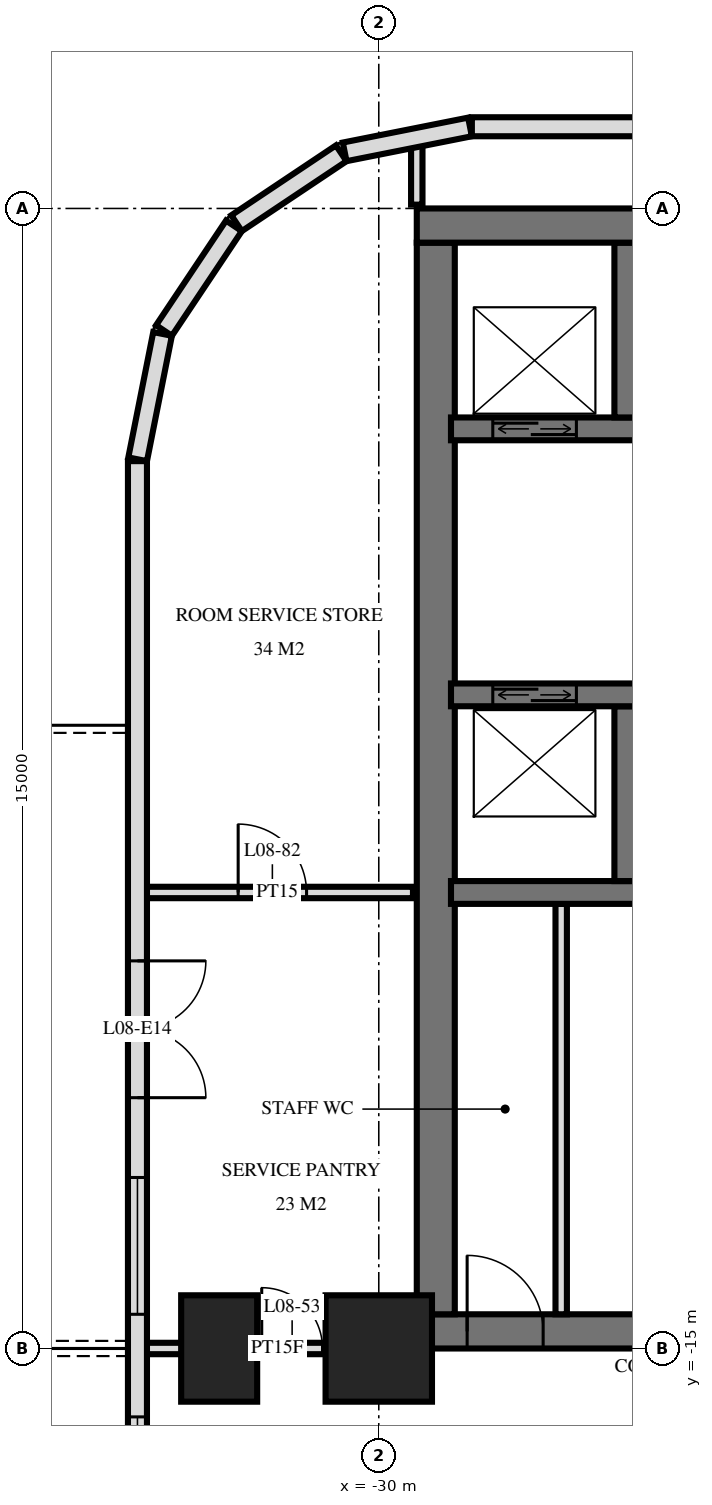
"""IFC4 building model, lengths in metres.
Left out: names, types, materials, properties, quantities, classifications, styles, units other than length and angle.
Written with IfcOpenShell. Run it as: python <this file> out.ifc"""

import sys

from ifc_helpers import new_model, si_unit, direction, frame, frame_2d, origin, origin_2d, place, context, subcontext, project, spatial, rectangle, extrude, element, fill, save


model = new_model("IFC4")
c1 = context("Model", 3, precision=1e-05, world=origin(), true_north=direction((0.0, 1.0)))
c2 = subcontext(c1, "Body", "Model", "MODEL_VIEW")
j1 = project(units=[si_unit("LENGTHUNIT", "METRE"), si_unit("PLANEANGLEUNIT", "RADIAN")], contexts=[c1])
p1 = place(None, origin())
s1 = spatial("IfcSite", under=j1, at=p1, CompositionType="ELEMENT")
p2 = place(p1, origin())
s2 = spatial("IfcBuilding", under=s1, at=p2, CompositionType="ELEMENT")
p3 = place(p2, frame((0.0, 0.0, 38.4)))
s3 = spatial("IfcBuildingStorey", under=s2, at=p3, CompositionType="ELEMENT", Elevation=38.4)
p4 = place(p3, frame((-32.1, -15.0, 0.0), z_axis=(0.0, 0.0, 1.0), x_axis=(0.0, 1.0, 0.0)))
e1 = element("IfcColumn", 1, at=p4, inside=s3, PredefinedType="COLUMN", context=c2, shape_type="SweptSolid", body=[
    extrude(rectangle(XDim=1.4, YDim=1.0, at=origin_2d()), origin(), (0.0, 0.0, 1.0), 3.6),
])
p5 = place(p3, frame((-30.0, -15.0, 0.0), z_axis=(0.0, 0.0, 1.0), x_axis=(1.0, 0.0, 0.0)))
e2 = element("IfcColumn", 2, at=p5, inside=s3, PredefinedType="COLUMN", context=c2, shape_type="SweptSolid", body=[
    extrude(rectangle(XDim=1.4, YDim=1.4, at=origin_2d()), origin(), (0.0, 0.0, 1.0), 3.6),
])
p6 = place(p3, frame((-29.5, -0.225, 0.0), z_axis=(0.0, 0.0, 1.0), x_axis=(1.0, 0.0, 0.0)))
e3 = element("IfcWall", 3, at=p6, inside=s3, PredefinedType="SHEAR", context=c2, shape_type="SweptSolid", body=[
    extrude(rectangle(XDim=19.5, YDim=0.45, at=frame_2d((9.75, 0.0))), origin(), (0.0, 0.0, 1.0), 3.6),
])
p7 = place(p3, frame((-29.5, -14.775, 0.0), z_axis=(0.0, 0.0, 1.0), x_axis=(1.0, 0.0, 0.0)))
e4 = element("IfcWall", 4, at=p7, inside=s3, PredefinedType="SHEAR", context=c2, shape_type="SweptSolid", body=[
    extrude(rectangle(XDim=19.5, YDim=0.45, at=frame_2d((9.75, 0.0))), origin(), (0.0, 0.0, 1.0), 3.6),
])
p8 = place(p7, frame((11.2, 0.0, 0.0)))
e5 = element("IfcOpeningElement", 5, at=p8, cuts=e4, PredefinedType="OPENING", context=c2, shape_type="SweptSolid", body=[
    extrude(rectangle(XDim=1.2, YDim=2.1, at=frame_2d((0.6, 1.05))), frame((0.0, 0.235, 0.0), z_axis=(0.0, -1.0, 0.0), x_axis=(1.0, 0.0, 0.0)), (0.0, 0.0, 1.0), 0.47),
])
p9 = place(p7, frame((14.25, 0.0, 0.0)))
e6 = element("IfcOpeningElement", 6, at=p9, cuts=e4, PredefinedType="OPENING", context=c2, shape_type="SweptSolid", body=[
    extrude(rectangle(XDim=1.1, YDim=2.1, at=frame_2d((0.55, 1.05))), frame((0.0, 0.235, 0.0), z_axis=(0.0, -1.0, 0.0), x_axis=(1.0, 0.0, 0.0)), (0.0, 0.0, 1.0), 0.47),
])
p10 = place(p7, frame((8.5, 0.0, 0.0)))
e7 = element("IfcOpeningElement", 7, at=p10, cuts=e4, PredefinedType="OPENING", context=c2, shape_type="SweptSolid", body=[
    extrude(rectangle(XDim=0.9, YDim=2.1, at=frame_2d((0.45, 1.05))), frame((0.0, 0.235, 0.0), z_axis=(0.0, -1.0, 0.0), x_axis=(1.0, 0.0, 0.0)), (0.0, 0.0, 1.0), 0.47),
])
p11 = place(p7, frame((6.05, 0.0, 0.0)))
e8 = element("IfcOpeningElement", 8, at=p11, cuts=e4, PredefinedType="OPENING", context=c2, shape_type="SweptSolid", body=[
    extrude(rectangle(XDim=1.0, YDim=2.1, at=frame_2d((0.5, 1.05))), frame((0.0, 0.235, 0.0), z_axis=(0.0, -1.0, 0.0), x_axis=(1.0, 0.0, 0.0)), (0.0, 0.0, 1.0), 0.47),
])
p12 = place(p7, frame((2.988, 0.0, 0.0)))
e9 = element("IfcOpeningElement", 9, at=p12, cuts=e4, PredefinedType="OPENING", context=c2, shape_type="SweptSolid", body=[
    extrude(rectangle(XDim=1.0, YDim=2.1, at=frame_2d((0.5, 1.05))), frame((0.0, 0.235, 0.0), z_axis=(0.0, -1.0, 0.0), x_axis=(1.0, 0.0, 0.0)), (0.0, 0.0, 1.0), 0.47),
])
p13 = place(p7, frame((0.663, 0.0, 0.0)))
e10 = element("IfcOpeningElement", 10, at=p13, cuts=e4, PredefinedType="OPENING", context=c2, shape_type="SweptSolid", body=[
    extrude(rectangle(XDim=1.0, YDim=2.1, at=frame_2d((0.5, 1.05))), frame((0.0, 0.235, 0.0), z_axis=(0.0, -1.0, 0.0), x_axis=(1.0, 0.0, 0.0)), (0.0, 0.0, 1.0), 0.47),
])
p14 = place(p3, frame((-29.25, -14.55, 0.0), z_axis=(0.0, 0.0, 1.0), x_axis=(0.0, 1.0, 0.0)))
e11 = element("IfcWall", 11, at=p14, inside=s3, PredefinedType="SHEAR", context=c2, shape_type="SweptSolid", body=[
    extrude(rectangle(XDim=14.1, YDim=0.5, at=frame_2d((7.05, 0.0))), origin(), (0.0, 0.0, 1.0), 3.6),
])
p15 = place(p3, frame((-29.05, -2.9, 0.0), z_axis=(0.0, 0.0, 1.0), x_axis=(1.0, 0.0, 0.0)))
e12 = element("IfcWall", 12, at=p15, inside=s3, PredefinedType="SHEAR", context=c2, shape_type="SweptSolid", body=[
    extrude(rectangle(XDim=18.7, YDim=0.3, at=frame_2d((9.35, 0.0))), origin(), (0.0, 0.0, 1.0), 3.6),
])
p16 = place(p15, frame((2.95, 0.0, 0.0)))
e13 = element("IfcOpeningElement", 13, at=p16, cuts=e12, PredefinedType="OPENING", context=c2, shape_type="SweptSolid", body=[
    extrude(rectangle(XDim=1.1, YDim=2.1, at=frame_2d((0.55, 1.05))), frame((0.0, 0.16, 0.0), z_axis=(0.0, -1.0, 0.0), x_axis=(1.0, 0.0, 0.0)), (0.0, 0.0, 1.0), 0.32),
])
p17 = place(p15, frame((0.55, 0.0, 0.0)))
e14 = element("IfcOpeningElement", 14, at=p17, cuts=e12, PredefinedType="OPENING", context=c2, shape_type="SweptSolid", body=[
    extrude(rectangle(XDim=1.1, YDim=2.1, at=frame_2d((0.55, 1.05))), frame((0.0, 0.16, 0.0), z_axis=(0.0, -1.0, 0.0), x_axis=(1.0, 0.0, 0.0)), (0.0, 0.0, 1.0), 0.32),
])
p18 = place(p15, frame((11.863, 0.0, 0.0)))
e15 = element("IfcOpeningElement", 15, at=p18, cuts=e12, PredefinedType="OPENING", context=c2, shape_type="SweptSolid", body=[
    extrude(rectangle(XDim=0.9, YDim=2.1, at=frame_2d((0.45, 1.05))), frame((0.0, 0.16, 0.0), z_axis=(0.0, -1.0, 0.0), x_axis=(1.0, 0.0, 0.0)), (0.0, 0.0, 1.0), 0.32),
])
p19 = place(p15, frame((10.438, 0.0, 0.0)))
e16 = element("IfcOpeningElement", 16, at=p19, cuts=e12, PredefinedType="OPENING", context=c2, shape_type="SweptSolid", body=[
    extrude(rectangle(XDim=0.9, YDim=2.1, at=frame_2d((0.45, 1.05))), frame((0.0, 0.16, 0.0), z_axis=(0.0, -1.0, 0.0), x_axis=(1.0, 0.0, 0.0)), (0.0, 0.0, 1.0), 0.32),
])
p20 = place(p15, frame((16.85, 0.0, 0.0)))
e17 = element("IfcOpeningElement", 17, at=p20, cuts=e12, PredefinedType="OPENING", context=c2, shape_type="SweptSolid", body=[
    extrude(rectangle(XDim=1.0, YDim=2.1, at=frame_2d((0.5, 1.05))), frame((0.0, 0.16, 0.0), z_axis=(0.0, -1.0, 0.0), x_axis=(1.0, 0.0, 0.0)), (0.0, 0.0, 1.0), 0.32),
])
p21 = place(p15, frame((14.562, 0.0, 0.0)))
e18 = element("IfcOpeningElement", 18, at=p21, cuts=e12, PredefinedType="OPENING", context=c2, shape_type="SweptSolid", body=[
    extrude(rectangle(XDim=1.0, YDim=2.1, at=frame_2d((0.5, 1.05))), frame((0.0, 0.16, 0.0), z_axis=(0.0, -1.0, 0.0), x_axis=(1.0, 0.0, 0.0)), (0.0, 0.0, 1.0), 0.32),
])
p22 = place(p15, frame((13.137, 0.0, 0.0)))
e19 = element("IfcOpeningElement", 19, at=p22, cuts=e12, PredefinedType="OPENING", context=c2, shape_type="SweptSolid", body=[
    extrude(rectangle(XDim=1.0, YDim=2.1, at=frame_2d((0.5, 1.05))), frame((0.0, 0.16, 0.0), z_axis=(0.0, -1.0, 0.0), x_axis=(1.0, 0.0, 0.0)), (0.0, 0.0, 1.0), 0.32),
])
p23 = place(p15, frame((5.6, 0.0, 0.0)))
e20 = element("IfcOpeningElement", 20, at=p23, cuts=e12, PredefinedType="OPENING", context=c2, shape_type="SweptSolid", body=[
    extrude(rectangle(XDim=1.0, YDim=2.1, at=frame_2d((0.5, 1.05))), frame((0.0, 0.16, 0.0), z_axis=(0.0, -1.0, 0.0), x_axis=(1.0, 0.0, 0.0)), (0.0, 0.0, 1.0), 0.32),
])
p24 = place(p3, frame((-29.05, -6.4, 0.0), z_axis=(0.0, 0.0, 1.0), x_axis=(1.0, 0.0, 0.0)))
e21 = element("IfcWall", 21, at=p24, inside=s3, PredefinedType="SHEAR", context=c2, shape_type="SweptSolid", body=[
    extrude(rectangle(XDim=18.7, YDim=0.3, at=frame_2d((9.35, 0.0))), origin(), (0.0, 0.0, 1.0), 3.6),
])
p25 = place(p24, frame((2.95, 0.0, 0.0)))
e22 = element("IfcOpeningElement", 22, at=p25, cuts=e21, PredefinedType="OPENING", context=c2, shape_type="SweptSolid", body=[
    extrude(rectangle(XDim=1.1, YDim=2.1, at=frame_2d((0.55, 1.05))), frame((0.0, 0.16, 0.0), z_axis=(0.0, -1.0, 0.0), x_axis=(1.0, 0.0, 0.0)), (0.0, 0.0, 1.0), 0.32),
])
p26 = place(p24, frame((0.55, 0.0, 0.0)))
e23 = element("IfcOpeningElement", 23, at=p26, cuts=e21, PredefinedType="OPENING", context=c2, shape_type="SweptSolid", body=[
    extrude(rectangle(XDim=1.1, YDim=2.1, at=frame_2d((0.55, 1.05))), frame((0.0, 0.16, 0.0), z_axis=(0.0, -1.0, 0.0), x_axis=(1.0, 0.0, 0.0)), (0.0, 0.0, 1.0), 0.32),
])
p27 = place(p24, frame((10.8, 0.0, 0.0)))
e24 = element("IfcOpeningElement", 24, at=p27, cuts=e21, PredefinedType="OPENING", context=c2, shape_type="SweptSolid", body=[
    extrude(rectangle(XDim=1.1, YDim=2.1, at=frame_2d((0.55, 1.05))), frame((0.0, 0.16, 0.0), z_axis=(0.0, -1.0, 0.0), x_axis=(1.0, 0.0, 0.0)), (0.0, 0.0, 1.0), 0.32),
])
p28 = place(p24, frame((5.6, 0.0, 0.0)))
e25 = element("IfcOpeningElement", 25, at=p28, cuts=e21, PredefinedType="OPENING", context=c2, shape_type="SweptSolid", body=[
    extrude(rectangle(XDim=1.0, YDim=2.1, at=frame_2d((0.5, 1.05))), frame((0.0, 0.16, 0.0), z_axis=(0.0, -1.0, 0.0), x_axis=(1.0, 0.0, 0.0)), (0.0, 0.0, 1.0), 0.32),
])
p29 = place(p3, frame((-29.05, -9.0, 0.0), z_axis=(0.0, 0.0, 1.0), x_axis=(1.0, 0.0, 0.0)))
e26 = element("IfcWall", 26, at=p29, inside=s3, PredefinedType="SHEAR", context=c2, shape_type="SweptSolid", body=[
    extrude(rectangle(XDim=18.7, YDim=0.3, at=frame_2d((9.35, 0.0))), origin(), (0.0, 0.0, 1.0), 3.6),
])
p30 = place(p29, frame((13.8, 0.0, 0.0)))
e27 = element("IfcOpeningElement", 27, at=p30, cuts=e26, PredefinedType="OPENING", context=c2, shape_type="SweptSolid", body=[
    extrude(rectangle(XDim=1.1, YDim=2.1, at=frame_2d((0.55, 1.05))), frame((0.0, 0.16, 0.0), z_axis=(0.0, -1.0, 0.0), x_axis=(1.0, 0.0, 0.0)), (0.0, 0.0, 1.0), 0.32),
])
for number, where, z_axis, x_axis in (
    (28, (-26.75, -2.75, 0.0), (0.0, 0.0, 1.0), (0.0, 1.0, 0.0)),
    (29, (-26.75, -8.85, 0.0), (0.0, 0.0, 1.0), (0.0, 1.0, 0.0)),
):
    element("IfcWall", number, at=place(p3, frame(where, z_axis=z_axis, x_axis=x_axis)), inside=s3, PredefinedType="SHEAR", context=c2, shape_type="SweptSolid", body=[
        extrude(rectangle(XDim=2.3, YDim=0.3, at=frame_2d((1.15, 0.0))), origin(), (0.0, 0.0, 1.0), 3.6),
    ])
p31 = place(p3, frame((28.775, 1.075, 0.0), z_axis=(0.0, 0.0, 1.0), x_axis=(-1.0, 0.0, 0.0)))
e30 = element("IfcWall", 30, at=p31, inside=s3, PredefinedType="SOLIDWALL", context=c2, shape_type="SweptSolid", body=[
    extrude(rectangle(XDim=57.551, YDim=0.25, at=frame_2d((28.775, 0.0))), origin(), (0.0, 0.0, 1.0), 3.32),
])
p32 = place(p31, frame((24.275, 0.0, 0.3)))
e31 = element("IfcOpeningElement", 31, at=p32, cuts=e30, PredefinedType="OPENING", context=c2, shape_type="SweptSolid", body=[
    extrude(rectangle(XDim=2.4, YDim=2.1, at=frame_2d((1.2, 1.05))), frame((0.0, 0.135, 0.0), z_axis=(0.0, -1.0, 0.0), x_axis=(1.0, 0.0, 0.0)), (0.0, 0.0, 1.0), 0.27),
])
p33 = place(p31, frame((35.325, 0.0, 0.3)))
e32 = element("IfcOpeningElement", 32, at=p33, cuts=e30, PredefinedType="OPENING", context=c2, shape_type="SweptSolid", body=[
    extrude(rectangle(XDim=2.4, YDim=2.1, at=frame_2d((1.2, 1.05))), frame((0.0, 0.135, 0.0), z_axis=(0.0, -1.0, 0.0), x_axis=(1.0, 0.0, 0.0)), (0.0, 0.0, 1.0), 0.27),
])
p34 = place(p3, frame((-28.8, 1.073, 0.0), z_axis=(0.0, 0.0, 1.0), x_axis=(-0.980803419081, -0.194999110559, 0.0)))
e33 = element("IfcWall", 33, at=p34, inside=s3, PredefinedType="SOLIDWALL", context=c2, shape_type="SweptSolid", body=[
    extrude(rectangle(XDim=1.681, YDim=0.25, at=frame_2d((0.841, 0.0))), origin(), (0.0, 0.0, 1.0), 3.32),
])
for number, where, z_axis, x_axis in (
    (34, (-30.494, 0.726, 0.0), (0.0, 0.0, 1.0), (-0.831, -0.556, 0.0)),
    (35, (-31.906, -0.229, 0.0), (0.0, 0.0, 1.0), (-0.556, -0.831, 0.0)),
):
    element("IfcWall", number, at=place(p3, frame(where, z_axis=z_axis, x_axis=x_axis)), inside=s3, PredefinedType="SOLIDWALL", context=c2, shape_type="SweptSolid", body=[
        extrude(rectangle(XDim=1.656, YDim=0.25, at=frame_2d((0.828, 0.0))), origin(), (0.0, 0.0, 1.0), 3.32),
    ])
p35 = place(p3, frame((-32.844, -1.651, 0.0), z_axis=(0.0, 0.0, 1.0), x_axis=(-0.19513878023, -0.980775640221, 0.0)))
e36 = element("IfcWall", 36, at=p35, inside=s3, PredefinedType="SOLIDWALL", context=c2, shape_type="SweptSolid", body=[
    extrude(rectangle(XDim=1.681, YDim=0.25, at=frame_2d((0.841, 0.0))), origin(), (0.0, 0.0, 1.0), 3.32),
])
p36 = place(p3, frame((-33.175, -3.325, 0.0), z_axis=(0.0, 0.0, 1.0), x_axis=(0.0, -1.0, 0.0)))
e37 = element("IfcWall", 37, at=p36, inside=s3, PredefinedType="SOLIDWALL", context=c2, shape_type="SweptSolid", body=[
    extrude(rectangle(XDim=21.551, YDim=0.25, at=frame_2d((10.775, 0.0))), origin(), (0.0, 0.0, 1.0), 3.32),
])
p37 = place(p36, frame((6.575, 0.0, 0.0)))
e38 = element("IfcOpeningElement", 38, at=p37, cuts=e37, PredefinedType="OPENING", context=c2, shape_type="SweptSolid", body=[
    extrude(rectangle(XDim=1.8, YDim=2.4, at=frame_2d((0.9, 1.2))), frame((0.0, 0.135, 0.0), z_axis=(0.0, -1.0, 0.0), x_axis=(1.0, 0.0, 0.0)), (0.0, 0.0, 1.0), 0.27),
])
p38 = place(p36, frame((9.425, 0.0, 0.3)))
e39 = element("IfcOpeningElement", 39, at=p38, cuts=e37, PredefinedType="OPENING", context=c2, shape_type="SweptSolid", body=[
    extrude(rectangle(XDim=1.8, YDim=2.1, at=frame_2d((0.9, 1.05))), frame((0.0, 0.135, 0.0), z_axis=(0.0, -1.0, 0.0), x_axis=(1.0, 0.0, 0.0)), (0.0, 0.0, 1.0), 0.27),
])
p39 = place(p36, frame((12.575, 0.0, 0.3)))
e40 = element("IfcOpeningElement", 40, at=p39, cuts=e37, PredefinedType="OPENING", context=c2, shape_type="SweptSolid", body=[
    extrude(rectangle(XDim=1.2, YDim=2.1, at=frame_2d((0.6, 1.05))), frame((0.0, 0.135, 0.0), z_axis=(0.0, -1.0, 0.0), x_axis=(1.0, 0.0, 0.0)), (0.0, 0.0, 1.0), 0.27),
])
p40 = place(p36, frame((15.6, 0.0, 0.0)))
e41 = element("IfcOpeningElement", 41, at=p40, cuts=e37, PredefinedType="OPENING", context=c2, shape_type="SweptSolid", body=[
    extrude(rectangle(XDim=1.8, YDim=2.4, at=frame_2d((0.9, 1.2))), frame((0.0, 0.135, 0.0), z_axis=(0.0, -1.0, 0.0), x_axis=(1.0, 0.0, 0.0)), (0.0, 0.0, 1.0), 0.27),
])
p41 = place(p36, frame((19.275, 0.0, 0.0)))
e42 = element("IfcOpeningElement", 42, at=p41, cuts=e37, PredefinedType="OPENING", context=c2, shape_type="SweptSolid", body=[
    extrude(rectangle(XDim=1.8, YDim=2.4, at=frame_2d((0.9, 1.2))), frame((0.0, 0.135, 0.0), z_axis=(0.0, -1.0, 0.0), x_axis=(1.0, 0.0, 0.0)), (0.0, 0.0, 1.0), 0.27),
])
p42 = place(p3, frame((-27.6, -14.55, 0.0), z_axis=(0.0, 0.0, 1.0), x_axis=(0.0, 1.0, 0.0)))
e43 = element("IfcWall", 43, at=p42, inside=s3, PredefinedType="PARTITIONING", context=c2, shape_type="SweptSolid", body=[
    extrude(rectangle(XDim=5.4, YDim=0.15, at=frame_2d((2.7, 0.0))), origin(), (0.0, 0.0, 1.0), 3.3),
])
p43 = place(p3, frame((-29.5, 0.05, 0.0), z_axis=(0.0, 0.0, 1.0), x_axis=(0.0, 1.0, 0.0)))
e44 = element("IfcWall", 44, at=p43, inside=s3, PredefinedType="PARTITIONING", context=c2, shape_type="SweptSolid", body=[
    extrude(rectangle(XDim=0.827, YDim=0.15, at=frame_2d((0.414, 0.0))), origin(), (0.0, 0.0, 1.0), 3.32),
])
p44 = place(p3, frame((-33.12, -15.0, 0.0), z_axis=(0.0, 0.0, 1.0), x_axis=(1.0, 0.0, 0.0)))
e45 = element("IfcWall", 45, at=p44, inside=s3, PredefinedType="PARTITIONING", context=c2, shape_type="SweptSolid", body=[
    extrude(rectangle(XDim=3.57, YDim=0.15, at=frame_2d((1.785, 0.0))), origin(), (0.0, 0.0, 1.0), 3.32),
])
p45 = place(p44, frame((1.58, 0.0, 0.0)))
e46 = element("IfcOpeningElement", 46, at=p45, cuts=e45, PredefinedType="OPENING", context=c2, shape_type="SweptSolid", body=[
    extrude(rectangle(XDim=0.8, YDim=2.1, at=frame_2d((0.4, 1.05))), frame((0.0, 0.085, 0.0), z_axis=(0.0, -1.0, 0.0), x_axis=(1.0, 0.0, 0.0)), (0.0, 0.0, 1.0), 0.17),
])
p46 = place(p3, frame((-33.12, -9.0, 0.0), z_axis=(0.0, 0.0, 1.0), x_axis=(1.0, 0.0, 0.0)))
e47 = element("IfcWall", 47, at=p46, inside=s3, PredefinedType="PARTITIONING", context=c2, shape_type="SweptSolid", body=[
    extrude(rectangle(XDim=3.57, YDim=0.15, at=frame_2d((1.785, 0.0))), origin(), (0.0, 0.0, 1.0), 3.32),
])
p47 = place(p46, frame((1.27, 0.0, 0.0)))
e48 = element("IfcOpeningElement", 48, at=p47, cuts=e47, PredefinedType="OPENING", context=c2, shape_type="SweptSolid", body=[
    extrude(rectangle(XDim=0.9, YDim=2.1, at=frame_2d((0.45, 1.05))), frame((0.0, 0.085, 0.0), z_axis=(0.0, -1.0, 0.0), x_axis=(1.0, 0.0, 0.0)), (0.0, 0.0, 1.0), 0.17),
])
p48 = place(p37, origin())
e49 = element("IfcDoor", 49, at=p48, inside=s3, OperationType="DOUBLE_DOOR_SINGLE_SWING", PredefinedType="DOOR", context=c2, shape_type="SweptSolid", body=[
    extrude(rectangle(XDim=1.8, YDim=2.4, at=frame_2d((0.9, 1.2))), frame((0.0, 0.025, 0.0), z_axis=(0.0, -1.0, 0.0), x_axis=(1.0, 0.0, 0.0)), (0.0, 0.0, 1.0), 0.05),
])
fill(e38, e49)
p49 = place(p38, origin())
e50 = element("IfcWindow", 50, at=p49, inside=s3, PartitioningType="SINGLE_PANEL", PredefinedType="WINDOW", context=c2, shape_type="SweptSolid", body=[
    extrude(rectangle(XDim=1.8, YDim=2.1, at=frame_2d((0.9, 1.05))), frame((0.0, 0.03, 0.0), z_axis=(0.0, -1.0, 0.0), x_axis=(1.0, 0.0, 0.0)), (0.0, 0.0, 1.0), 0.06),
])
fill(e39, e50)
p50 = place(p39, origin())
e51 = element("IfcWindow", 51, at=p50, inside=s3, PartitioningType="SINGLE_PANEL", PredefinedType="WINDOW", context=c2, shape_type="SweptSolid", body=[
    extrude(rectangle(XDim=1.2, YDim=2.1, at=frame_2d((0.6, 1.05))), frame((0.0, 0.03, 0.0), z_axis=(0.0, -1.0, 0.0), x_axis=(1.0, 0.0, 0.0)), (0.0, 0.0, 1.0), 0.06),
])
fill(e40, e51)
p51 = place(p17, origin())
e52 = element("IfcDoor", 52, at=p51, inside=s3, OperationType="DOUBLE_DOOR_SLIDING", PredefinedType="USERDEFINED", context=c2, shape_type="SweptSolid", body=[
    extrude(rectangle(XDim=1.1, YDim=2.1, at=frame_2d((0.55, 1.05))), frame((0.0, 0.025, 0.0), z_axis=(0.0, -1.0, 0.0), x_axis=(1.0, 0.0, 0.0)), (0.0, 0.0, 1.0), 0.05),
])
fill(e14, e52)
p52 = place(p26, origin())
e53 = element("IfcDoor", 53, at=p52, inside=s3, OperationType="DOUBLE_DOOR_SLIDING", PredefinedType="USERDEFINED", context=c2, shape_type="SweptSolid", body=[
    extrude(rectangle(XDim=1.1, YDim=2.1, at=frame_2d((0.55, 1.05))), frame((0.0, 0.025, 0.0), z_axis=(0.0, -1.0, 0.0), x_axis=(1.0, 0.0, 0.0)), (0.0, 0.0, 1.0), 0.05),
])
fill(e23, e53)
p53 = place(p13, origin())
e54 = element("IfcDoor", 54, at=p53, inside=s3, OperationType="SINGLE_SWING_RIGHT", PredefinedType="DOOR", context=c2, shape_type="SweptSolid", body=[
    extrude(rectangle(XDim=1.0, YDim=2.1, at=frame_2d((0.5, 1.05))), frame((0.0, 0.025, 0.0), z_axis=(0.0, -1.0, 0.0), x_axis=(1.0, 0.0, 0.0)), (0.0, 0.0, 1.0), 0.05),
])
fill(e10, e54)
p54 = place(p45, origin())
e55 = element("IfcDoor", 55, at=p54, inside=s3, OperationType="SINGLE_SWING_RIGHT", PredefinedType="DOOR", context=c2, shape_type="SweptSolid", body=[
    extrude(rectangle(XDim=0.8, YDim=2.1, at=frame_2d((0.4, 1.05))), frame((0.0, 0.025, 0.0), z_axis=(0.0, -1.0, 0.0), x_axis=(1.0, 0.0, 0.0)), (0.0, 0.0, 1.0), 0.05),
])
fill(e46, e55)
p55 = place(p47, origin())
e56 = element("IfcDoor", 56, at=p55, inside=s3, OperationType="SINGLE_SWING_RIGHT", PredefinedType="DOOR", context=c2, shape_type="SweptSolid", body=[
    extrude(rectangle(XDim=0.9, YDim=2.1, at=frame_2d((0.45, 1.05))), frame((0.0, 0.025, 0.0), z_axis=(0.0, -1.0, 0.0), x_axis=(1.0, 0.0, 0.0)), (0.0, 0.0, 1.0), 0.05),
])
fill(e48, e56)
save(model, sys.argv[1])
